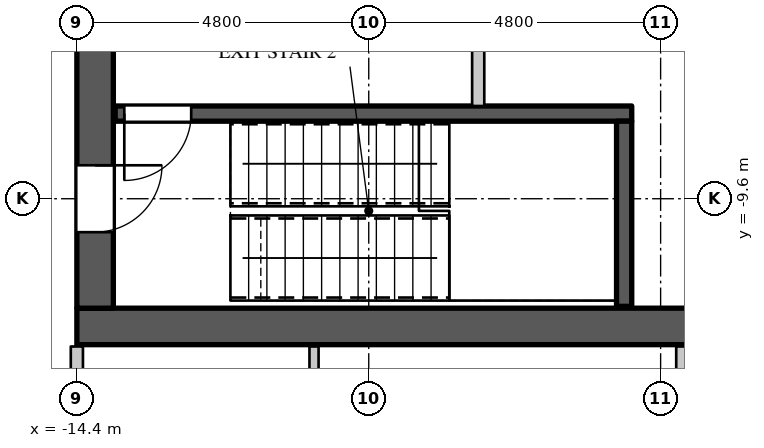
"""IFC4 building model, lengths in metres.
Left out: names, types, materials, properties, quantities, classifications, styles, units other than length and angle.
Written with IfcOpenShell. Run it as: python <this file> out.ifc"""

import sys

from ifc_helpers import new_model, si_unit, direction, frame, frame_2d, origin, place, context, subcontext, project, spatial, rectangle, extrude, element, fill, save


model = new_model("IFC4")
c1 = context("Model", 3, precision=1e-05, world=origin(), true_north=direction((0.0, 1.0)))
c2 = subcontext(c1, "Body", "Model", "MODEL_VIEW")
j1 = project(units=[si_unit("LENGTHUNIT", "METRE"), si_unit("PLANEANGLEUNIT", "RADIAN")], contexts=[c1])
p1 = place(None, origin())
s1 = spatial("IfcSite", under=j1, at=p1, CompositionType="ELEMENT")
p2 = place(p1, origin())
s2 = spatial("IfcBuilding", under=s1, at=p2, CompositionType="ELEMENT")
p3 = place(p2, frame((0.0, 0.0, 226.5)))
s3 = spatial("IfcBuildingStorey", under=s2, at=p3, CompositionType="ELEMENT", Elevation=226.5)
p4 = place(p3, frame((-14.4, -11.7, 0.0), z_axis=(0.0, 0.0, 1.0), x_axis=(1.0, 0.0, 0.0)))
e1 = element("IfcWall", 1, at=p4, inside=s3, PredefinedType="SHEAR", context=c2, shape_type="SweptSolid", body=[
    extrude(rectangle(XDim=28.8, YDim=0.6, at=frame_2d((14.4, 0.0))), origin(), (0.0, 0.0, 1.0), 4.2),
])
p5 = place(p3, frame((-14.1, -11.4, 0.0), z_axis=(0.0, 0.0, 1.0), x_axis=(0.0, 1.0, 0.0)))
e2 = element("IfcWall", 2, at=p5, inside=s3, PredefinedType="SHEAR", context=c2, shape_type="SweptSolid", body=[
    extrude(rectangle(XDim=22.8, YDim=0.6, at=frame_2d((11.4, 0.0))), origin(), (0.0, 0.0, 1.0), 4.2),
])
p6 = place(p5, frame((20.45, 0.0, 0.0)))
e3 = element("IfcOpeningElement", 3, at=p6, cuts=e2, PredefinedType="OPENING", context=c2, shape_type="SweptSolid", body=[
    extrude(rectangle(XDim=1.1, YDim=2.2, at=frame_2d((0.55, 1.1))), frame((0.0, 0.31, 0.0), z_axis=(0.0, -1.0, 0.0), x_axis=(1.0, 0.0, 0.0)), (0.0, 0.0, 1.0), 0.62),
])
p7 = place(p5, frame((1.25, 0.0, 0.0)))
e4 = element("IfcOpeningElement", 4, at=p7, cuts=e2, PredefinedType="OPENING", context=c2, shape_type="SweptSolid", body=[
    extrude(rectangle(XDim=1.1, YDim=2.2, at=frame_2d((0.55, 1.1))), frame((0.0, 0.31, 0.0), z_axis=(0.0, -1.0, 0.0), x_axis=(1.0, 0.0, 0.0)), (0.0, 0.0, 1.0), 0.62),
])
p8 = place(p5, frame((16.15, 0.0, 0.0)))
e5 = element("IfcOpeningElement", 5, at=p8, cuts=e2, PredefinedType="OPENING", context=c2, shape_type="SweptSolid", body=[
    extrude(rectangle(XDim=1.5, YDim=2.4, at=frame_2d((0.75, 1.2))), frame((0.0, 0.31, 0.0), z_axis=(0.0, -1.0, 0.0), x_axis=(1.0, 0.0, 0.0)), (0.0, 0.0, 1.0), 0.62),
])
p9 = place(p5, frame((5.15, 0.0, 0.0)))
e6 = element("IfcOpeningElement", 6, at=p9, cuts=e2, PredefinedType="OPENING", context=c2, shape_type="SweptSolid", body=[
    extrude(rectangle(XDim=1.5, YDim=2.4, at=frame_2d((0.75, 1.2))), frame((0.0, 0.31, 0.0), z_axis=(0.0, -1.0, 0.0), x_axis=(1.0, 0.0, 0.0)), (0.0, 0.0, 1.0), 0.62),
])
p10 = place(p3, frame((-14.4, -14.3, 0.0), z_axis=(0.0, 0.0, 1.0), x_axis=(0.0, 1.0, 0.0)))
e7 = element("IfcWall", 7, at=p10, inside=s3, PredefinedType="PARTITIONING", context=c2, shape_type="SweptSolid", body=[
    extrude(rectangle(XDim=2.27, YDim=0.2, at=frame_2d((1.135, 0.0))), origin(), (0.0, 0.0, 1.0), 3.95),
])
p11 = place(p3, frame((-7.8, -8.075, 0.0), z_axis=(0.0, 0.0, 1.0), x_axis=(0.0, 1.0, 0.0)))
e8 = element("IfcWall", 8, at=p11, inside=s3, PredefinedType="PARTITIONING", context=c2, shape_type="SweptSolid", body=[
    extrude(rectangle(XDim=5.275, YDim=0.2, at=frame_2d((2.637, 0.0))), origin(), (0.0, 0.0, 1.0), 3.95),
])
p12 = place(p11, frame((3.0, 0.0, 0.0)))
e9 = element("IfcOpeningElement", 9, at=p12, cuts=e8, PredefinedType="OPENING", context=c2, shape_type="SweptSolid", body=[
    extrude(rectangle(XDim=1.5, YDim=2.4, at=frame_2d((0.75, 1.2))), frame((0.0, 0.11, 0.0), z_axis=(0.0, -1.0, 0.0), x_axis=(1.0, 0.0, 0.0)), (0.0, 0.0, 1.0), 0.22),
])
p13 = place(p3, frame((-10.5, -17.475, 0.0), z_axis=(0.0, 0.0, 1.0), x_axis=(0.0, 1.0, 0.0)))
e10 = element("IfcWall", 10, at=p13, inside=s3, PredefinedType="PARTITIONING", context=c2, shape_type="SweptSolid", body=[
    extrude(rectangle(XDim=5.445, YDim=0.15, at=frame_2d((2.723, 0.0))), origin(), (0.0, 0.0, 1.0), 3.95),
])
p14 = place(p13, frame((2.25, 0.0, 0.0)))
e11 = element("IfcOpeningElement", 11, at=p14, cuts=e10, PredefinedType="OPENING", context=c2, shape_type="SweptSolid", body=[
    extrude(rectangle(XDim=0.95, YDim=2.2, at=frame_2d((0.475, 1.1))), frame((0.0, 0.085, 0.0), z_axis=(0.0, -1.0, 0.0), x_axis=(1.0, 0.0, 0.0)), (0.0, 0.0, 1.0), 0.17),
])
p15 = place(p3, frame((-4.469, -25.95, 0.0), z_axis=(0.0, 0.0, 1.0), x_axis=(0.0, 1.0, 0.0)))
e12 = element("IfcWall", 12, at=p15, inside=s3, PredefinedType="PARTITIONING", context=c2, shape_type="SweptSolid", body=[
    extrude(rectangle(XDim=13.92, YDim=0.15, at=frame_2d((6.96, 0.0))), origin(), (0.0, 0.0, 1.0), 3.3),
])
p16 = place(p15, frame((3.3, 0.0, 0.0)))
e13 = element("IfcOpeningElement", 13, at=p16, cuts=e12, PredefinedType="OPENING", context=c2, shape_type="SweptSolid", body=[
    extrude(rectangle(XDim=0.95, YDim=2.2, at=frame_2d((0.475, 1.1))), frame((0.0, 0.085, 0.0), z_axis=(0.0, -1.0, 0.0), x_axis=(1.0, 0.0, 0.0)), (0.0, 0.0, 1.0), 0.17),
])
p17 = place(p3, frame((-13.77, -8.2, 0.0), z_axis=(0.0, 0.0, 1.0), x_axis=(1.0, 0.0, 0.0)))
e14 = element("IfcWall", 14, at=p17, inside=s3, PredefinedType="SHEAR", context=c2, shape_type="SweptSolid", body=[
    extrude(rectangle(XDim=8.495, YDim=0.25, at=frame_2d((4.248, 0.0))), origin(), (0.0, 0.0, 1.0), 3.95),
])
p18 = place(p17, frame((0.15, 0.0, 0.0)))
e15 = element("IfcOpeningElement", 15, at=p18, cuts=e14, PredefinedType="OPENING", context=c2, shape_type="SweptSolid", body=[
    extrude(rectangle(XDim=1.1, YDim=2.2, at=frame_2d((0.55, 1.1))), frame((0.0, 0.135, 0.0), z_axis=(0.0, -1.0, 0.0), x_axis=(1.0, 0.0, 0.0)), (0.0, 0.0, 1.0), 0.27),
])
p19 = place(p3, frame((-5.4, -11.37, 0.0), z_axis=(0.0, 0.0, 1.0), x_axis=(0.0, 1.0, 0.0)))
e16 = element("IfcWall", 16, at=p19, inside=s3, PredefinedType="SHEAR", context=c2, shape_type="SweptSolid", body=[
    extrude(rectangle(XDim=3.045, YDim=0.25, at=frame_2d((1.522, 0.0))), origin(), (0.0, 0.0, 1.0), 3.95),
])
p20 = place(p18, origin())
e17 = element("IfcDoor", 17, at=p20, inside=s3, OperationType="SINGLE_SWING_RIGHT", PredefinedType="DOOR", context=c2, shape_type="SweptSolid", body=[
    extrude(rectangle(XDim=1.1, YDim=2.2, at=frame_2d((0.55, 1.1))), frame((0.0, 0.025, 0.0), z_axis=(0.0, -1.0, 0.0), x_axis=(1.0, 0.0, 0.0)), (0.0, 0.0, 1.0), 0.05),
])
fill(e15, e17)
p21 = place(p7, origin())
e18 = element("IfcDoor", 18, at=p21, inside=s3, OperationType="SINGLE_SWING_LEFT", PredefinedType="DOOR", context=c2, shape_type="SweptSolid", body=[
    extrude(rectangle(XDim=1.1, YDim=2.2, at=frame_2d((0.55, 1.1))), frame((0.0, -0.245, 0.0), z_axis=(0.0, -1.0, 0.0), x_axis=(1.0, 0.0, 0.0)), (0.0, 0.0, 1.0), 0.05),
])
fill(e4, e18)
save(model, sys.argv[1])
